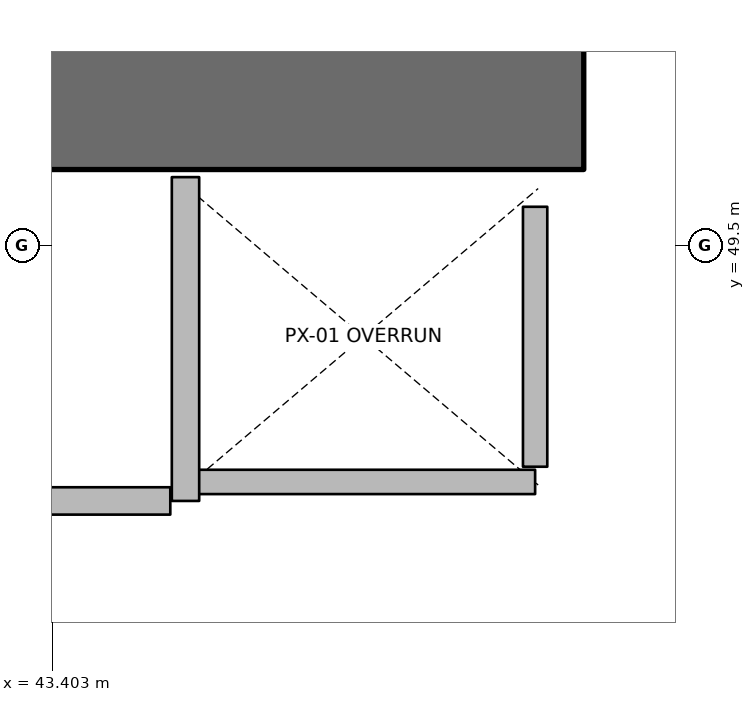
"""IFC4 building model, lengths in metres.
Left out: names, types, materials, properties, quantities, classifications, styles, units other than length and angle.
Written with IfcOpenShell. Run it as: python <this file> out.ifc"""

import sys

from ifc_helpers import new_model, si_unit, direction, frame, frame_2d, origin, place, context, subcontext, project, spatial, rectangle, extrude, element, save


model = new_model("IFC4")
c1 = context("Model", 3, precision=1e-05, world=origin(), true_north=direction((0.0, 1.0)))
c2 = subcontext(c1, "Body", "Model", "MODEL_VIEW")
j1 = project(units=[si_unit("LENGTHUNIT", "METRE"), si_unit("PLANEANGLEUNIT", "RADIAN")], contexts=[c1])
p1 = place(None, origin())
s1 = spatial("IfcSite", under=j1, at=p1, CompositionType="ELEMENT")
p2 = place(p1, origin())
s2 = spatial("IfcBuilding", under=s1, at=p2, CompositionType="ELEMENT")
p3 = place(p2, frame((0.0, 0.0, 26.4)))
s3 = spatial("IfcBuildingStorey", under=s2, at=p3, CompositionType="ELEMENT", Elevation=26.4)
p4 = place(p3, frame((36.85, 50.475, 0.0), z_axis=(0.0, 0.0, 1.0), x_axis=(1.0, 0.0, 0.0)))
e1 = element("IfcWall", 1, at=p4, inside=s3, PredefinedType="SHEAR", context=c2, shape_type="SweptSolid", body=[
    extrude(rectangle(XDim=10.05, YDim=0.95, at=frame_2d((5.025, 0.0))), origin(), (0.0, 0.0, 1.0), 3.75),
])
p5 = place(p3, frame((46.58, 47.945, 0.0), z_axis=(0.0, 0.0, 1.0), x_axis=(-1.0, 0.0, 0.0)))
e2 = element("IfcWall", 2, at=p5, inside=s3, PredefinedType="PARTITIONING", context=c2, shape_type="SweptSolid", body=[
    extrude(rectangle(XDim=2.26, YDim=0.16, at=frame_2d((1.13, 0.0))), origin(), (0.0, 0.0, 1.0), 3.5),
])
p6 = place(p3, frame((46.58, 48.045, 0.0), z_axis=(0.0, 0.0, 1.0), x_axis=(0.0, 1.0, 0.0)))
e3 = element("IfcWall", 3, at=p6, inside=s3, PredefinedType="PARTITIONING", context=c2, shape_type="SweptSolid", body=[
    extrude(rectangle(XDim=1.71, YDim=0.16, at=frame_2d((0.855, 0.0))), origin(), (0.0, 0.0, 1.0), 3.5),
])
p7 = place(p3, frame((37.92, 47.82, 0.0), z_axis=(0.0, 0.0, 1.0), x_axis=(1.0, 0.0, 0.0)))
e4 = element("IfcWall", 4, at=p7, inside=s3, PredefinedType="PARTITIONING", context=c2, shape_type="SweptSolid", body=[
    extrude(rectangle(XDim=6.26, YDim=0.18, at=frame_2d((3.13, 0.0))), origin(), (0.0, 0.0, 1.0), 3.5),
])
p8 = place(p7, frame((2.705, 0.0, 0.0)))
e5 = element("IfcOpeningElement", 5, at=p8, cuts=e4, PredefinedType="OPENING", context=c2, shape_type="SweptSolid", body=[
    extrude(rectangle(XDim=0.85, YDim=2.06, at=frame_2d((0.425, 1.03))), frame((0.0, 0.1, 0.0), z_axis=(0.0, -1.0, 0.0), x_axis=(1.0, 0.0, 0.0)), (0.0, 0.0, 1.0), 0.2),
])
p9 = place(p3, frame((44.28, 47.82, 0.0), z_axis=(0.0, 0.0, 1.0), x_axis=(0.0, 1.0, 0.0)))
e6 = element("IfcWall", 6, at=p9, inside=s3, PredefinedType="PARTITIONING", context=c2, shape_type="SweptSolid", body=[
    extrude(rectangle(XDim=2.13, YDim=0.18, at=frame_2d((1.065, 0.0))), origin(), (0.0, 0.0, 1.0), 3.5),
])
save(model, sys.argv[1])
